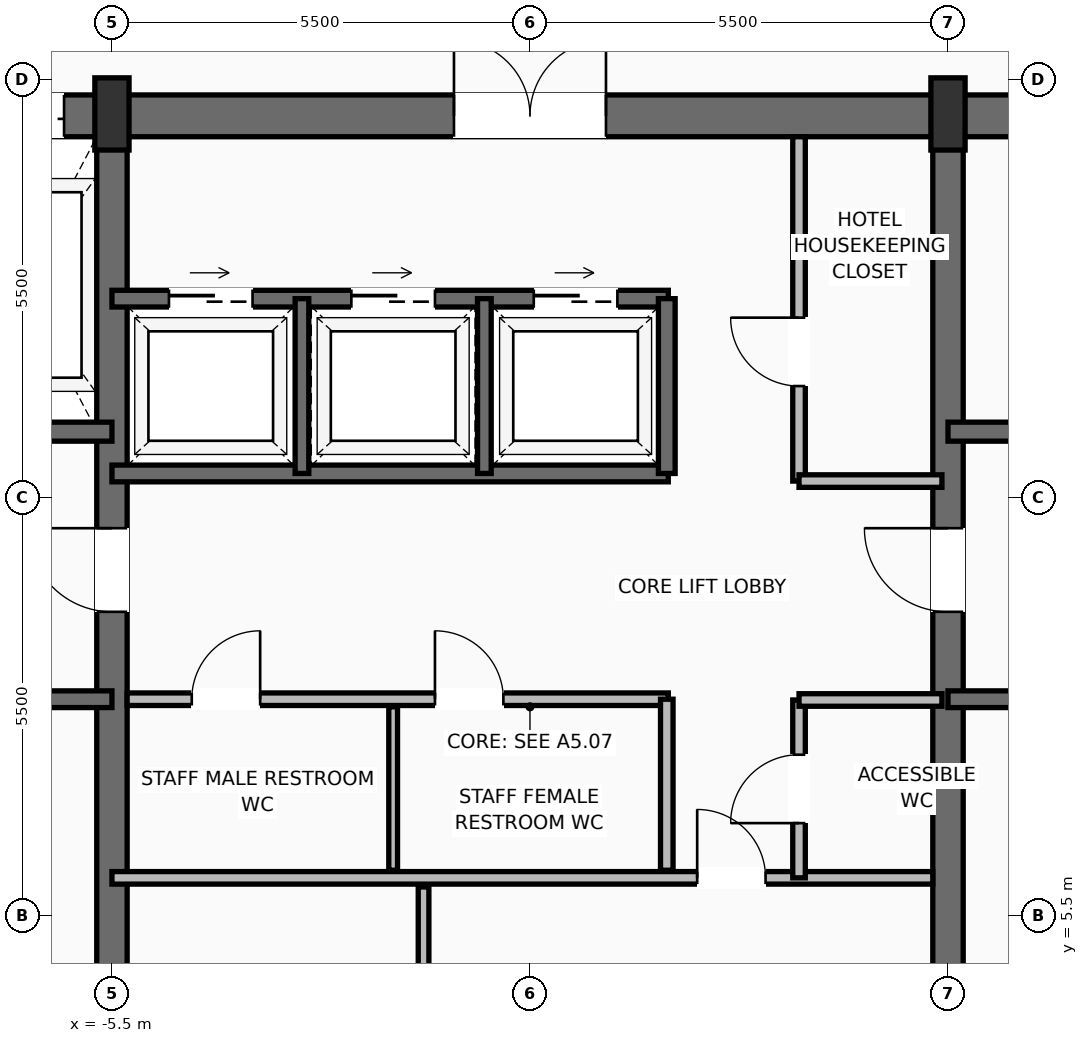
"""IFC4 building model, lengths in metres.
Left out: names, types, materials, properties, quantities, classifications, styles, units other than length and angle.
Written with IfcOpenShell. Run it as: python <this file> out.ifc"""

import sys

from ifc_helpers import new_model, si_unit, direction, frame, frame_2d, origin, origin_2d, place, context, subcontext, project, spatial, rectangle, extrude, source, transform, mapped, element, fill, save


model = new_model("IFC4")
c1 = context("Model", 3, precision=1e-05, world=origin(), true_north=direction((0.0, 1.0)))
c2 = subcontext(c1, "Body", "Model", "MODEL_VIEW")
j1 = project(units=[si_unit("LENGTHUNIT", "METRE"), si_unit("PLANEANGLEUNIT", "RADIAN")], contexts=[c1])
p1 = place(None, origin())
s1 = spatial("IfcSite", under=j1, at=p1, CompositionType="ELEMENT")
p2 = place(p1, origin())
s2 = spatial("IfcBuilding", under=s1, at=p2, CompositionType="ELEMENT")
p3 = place(p2, frame((0.0, 0.0, 240.7)))
s3 = spatial("IfcBuildingStorey", under=s2, at=p3, CompositionType="ELEMENT", Elevation=240.7)
p4 = place(p3, frame((-10.7, 16.025, 0.0), z_axis=(0.0, 0.0, 1.0), x_axis=(1.0, 0.0, 0.0)))
e1 = element("IfcWall", 1, at=p4, inside=s3, PredefinedType="SHEAR", context=c2, shape_type="SweptSolid", body=[
    extrude(rectangle(XDim=21.4, YDim=0.55, at=frame_2d((10.7, 0.0))), origin(), (0.0, 0.0, 1.0), 3.24),
])
p5 = place(p4, frame((3.27, 0.0, 0.0)))
e2 = element("IfcOpeningElement", 2, at=p5, cuts=e1, PredefinedType="OPENING", context=c2, shape_type="SweptSolid", body=[
    extrude(rectangle(XDim=1.3, YDim=2.3, at=frame_2d((0.65, 1.15))), frame((0.0, 0.285, 0.0), z_axis=(0.0, -1.0, 0.0), x_axis=(1.0, 0.0, 0.0)), (0.0, 0.0, 1.0), 0.57),
])
p6 = place(p4, frame((9.7, 0.0, 0.0)))
e3 = element("IfcOpeningElement", 3, at=p6, cuts=e1, PredefinedType="OPENING", context=c2, shape_type="SweptSolid", body=[
    extrude(rectangle(XDim=2.0, YDim=2.4, at=frame_2d((1.0, 1.2))), frame((0.0, 0.285, 0.0), z_axis=(0.0, -1.0, 0.0), x_axis=(1.0, 0.0, 0.0)), (0.0, 0.0, 1.0), 0.57),
])
p7 = place(p3, frame((-5.5, 0.575, 0.0), z_axis=(0.0, 0.0, 1.0), x_axis=(0.0, 1.0, 0.0)))
e4 = element("IfcWall", 4, at=p7, inside=s3, PredefinedType="SHEAR", context=c2, shape_type="SweptSolid", body=[
    extrude(rectangle(XDim=15.45, YDim=0.4, at=frame_2d((7.725, 0.0))), origin(), (0.0, 0.0, 1.0), 3.24),
])
p8 = place(p7, frame((8.925, 0.0, 0.0)))
e5 = element("IfcOpeningElement", 5, at=p8, cuts=e4, PredefinedType="OPENING", context=c2, shape_type="SweptSolid", body=[
    extrude(rectangle(XDim=1.1, YDim=2.2, at=frame_2d((0.55, 1.1))), frame((0.0, 0.21, 0.0), z_axis=(0.0, -1.0, 0.0), x_axis=(1.0, 0.0, 0.0)), (0.0, 0.0, 1.0), 0.42),
])
p9 = place(p3, frame((5.5, 0.575, 0.0), z_axis=(0.0, 0.0, 1.0), x_axis=(0.0, 1.0, 0.0)))
e6 = element("IfcWall", 6, at=p9, inside=s3, PredefinedType="SHEAR", context=c2, shape_type="SweptSolid", body=[
    extrude(rectangle(XDim=15.45, YDim=0.4, at=frame_2d((7.725, 0.0))), origin(), (0.0, 0.0, 1.0), 3.24),
])
p10 = place(p9, frame((8.925, 0.0, 0.0)))
e7 = element("IfcOpeningElement", 7, at=p10, cuts=e6, PredefinedType="OPENING", context=c2, shape_type="SweptSolid", body=[
    extrude(rectangle(XDim=1.1, YDim=2.2, at=frame_2d((0.55, 1.1))), frame((0.0, 0.21, 0.0), z_axis=(0.0, -1.0, 0.0), x_axis=(1.0, 0.0, 0.0)), (0.0, 0.0, 1.0), 0.42),
])
m1 = source(origin(), c2, "Body", "SweptSolid", [
    extrude(rectangle(XDim=0.45, YDim=0.95, at=origin_2d()), origin(), (0.0, 0.0, 1.0), 3.45),
])
for number, where, z_axis, x_axis in (
    (8, (-5.5, 16.05, 0.0), (0.0, 0.0, 1.0), (1.0, 0.0, 0.0)),
    (9, (5.5, 16.05, 0.0), (0.0, 0.0, 1.0), (1.0, 0.0, 0.0)),
):
    element("IfcColumn", number, at=place(p3, frame(where, z_axis=z_axis, x_axis=x_axis)), inside=s3, PredefinedType="PILASTER", context=c2, shape_type="MappedRepresentation", body=[
        mapped(m1, transform((0.0, 0.0, 0.0), scale=1.0)),
    ])
p11 = place(p3, frame((-5.5, 8.35, 0.0), z_axis=(0.0, 0.0, 1.0), x_axis=(-1.0, 0.0, 0.0)))
e10 = element("IfcWall", 10, at=p11, inside=s3, PredefinedType="SOLIDWALL", context=c2, shape_type="SweptSolid", body=[
    extrude(rectangle(XDim=4.65, YDim=0.22, at=frame_2d((2.325, 0.0))), origin(), (0.0, 0.0, 1.0), 3.24),
])
p12 = place(p11, frame((2.5, 0.0, 0.0)))
e11 = element("IfcOpeningElement", 11, at=p12, cuts=e10, PredefinedType="OPENING", context=c2, shape_type="SweptSolid", body=[
    extrude(rectangle(XDim=1.15, YDim=2.2, at=frame_2d((0.575, 1.1))), frame((0.0, 0.12, 0.0), z_axis=(0.0, -1.0, 0.0), x_axis=(1.0, 0.0, 0.0)), (0.0, 0.0, 1.0), 0.24),
])
p13 = place(p3, frame((-5.5, 11.87, 0.0), z_axis=(0.0, 0.0, 1.0), x_axis=(-1.0, 0.0, 0.0)))
e12 = element("IfcWall", 12, at=p13, inside=s3, PredefinedType="SOLIDWALL", context=c2, shape_type="SweptSolid", body=[
    extrude(rectangle(XDim=4.65, YDim=0.25, at=frame_2d((2.325, 0.0))), origin(), (0.0, 0.0, 1.0), 3.24),
])
p14 = place(p13, frame((2.95, 0.0, 0.0)))
e13 = element("IfcOpeningElement", 13, at=p14, cuts=e12, PredefinedType="OPENING", context=c2, shape_type="SweptSolid", body=[
    extrude(rectangle(XDim=1.2, YDim=2.25, at=frame_2d((0.6, 1.125))), frame((0.0, 0.135, 0.0), z_axis=(0.0, -1.0, 0.0), x_axis=(1.0, 0.0, 0.0)), (0.0, 0.0, 1.0), 0.27),
])
p15 = place(p3, frame((10.15, 8.35, 0.0), z_axis=(0.0, 0.0, 1.0), x_axis=(-1.0, 0.0, 0.0)))
e14 = element("IfcWall", 14, at=p15, inside=s3, PredefinedType="SOLIDWALL", context=c2, shape_type="SweptSolid", body=[
    extrude(rectangle(XDim=4.65, YDim=0.22, at=frame_2d((2.325, 0.0))), origin(), (0.0, 0.0, 1.0), 3.24),
])
p16 = place(p15, frame((1.0, 0.0, 0.0)))
e15 = element("IfcOpeningElement", 15, at=p16, cuts=e14, PredefinedType="OPENING", context=c2, shape_type="SweptSolid", body=[
    extrude(rectangle(XDim=1.15, YDim=2.2, at=frame_2d((0.575, 1.1))), frame((0.0, 0.12, 0.0), z_axis=(0.0, -1.0, 0.0), x_axis=(1.0, 0.0, 0.0)), (0.0, 0.0, 1.0), 0.24),
])
p17 = place(p3, frame((10.15, 11.87, 0.0), z_axis=(0.0, 0.0, 1.0), x_axis=(-1.0, 0.0, 0.0)))
e16 = element("IfcWall", 16, at=p17, inside=s3, PredefinedType="SOLIDWALL", context=c2, shape_type="SweptSolid", body=[
    extrude(rectangle(XDim=4.65, YDim=0.25, at=frame_2d((2.325, 0.0))), origin(), (0.0, 0.0, 1.0), 3.24),
])
p18 = place(p17, frame((0.5, 0.0, 0.0)))
e17 = element("IfcOpeningElement", 17, at=p18, cuts=e16, PredefinedType="OPENING", context=c2, shape_type="SweptSolid", body=[
    extrude(rectangle(XDim=1.2, YDim=2.25, at=frame_2d((0.6, 1.125))), frame((0.0, 0.135, 0.0), z_axis=(0.0, -1.0, 0.0), x_axis=(1.0, 0.0, 0.0)), (0.0, 0.0, 1.0), 0.27),
])
p19 = place(p3, frame((-5.5, 6.0, 0.0), z_axis=(0.0, 0.0, 1.0), x_axis=(1.0, 0.0, 0.0)))
e18 = element("IfcWall", 18, at=p19, inside=s3, PredefinedType="PARTITIONING", context=c2, shape_type="SweptSolid", body=[
    extrude(rectangle(XDim=10.8, YDim=0.165, at=frame_2d((5.4, 0.0))), origin(), (0.0, 0.0, 1.0), 3.232),
])
p20 = place(p19, frame((7.7, 0.0, 0.0)))
e19 = element("IfcOpeningElement", 19, at=p20, cuts=e18, PredefinedType="OPENING", context=c2, shape_type="SweptSolid", body=[
    extrude(rectangle(XDim=0.9, YDim=2.1, at=frame_2d((0.45, 1.05))), frame((0.0, 0.093, 0.0), z_axis=(0.0, -1.0, 0.0), x_axis=(1.0, 0.0, 0.0)), (0.0, 0.0, 1.0), 0.185),
])
p21 = place(p3, frame((-1.4, 0.85, 0.0), z_axis=(0.0, 0.0, 1.0), x_axis=(0.0, 1.0, 0.0)))
e20 = element("IfcWall", 20, at=p21, inside=s3, PredefinedType="PARTITIONING", context=c2, shape_type="SweptSolid", body=[
    extrude(rectangle(XDim=5.03, YDim=0.14, at=frame_2d((2.515, 0.0))), origin(), (0.0, 0.0, 1.0), 3.232),
])
p22 = place(p21, frame((2.1, 0.0, 0.0)))
e21 = element("IfcOpeningElement", 21, at=p22, cuts=e20, PredefinedType="OPENING", context=c2, shape_type="SweptSolid", body=[
    extrude(rectangle(XDim=0.9, YDim=2.1, at=frame_2d((0.45, 1.05))), frame((0.0, 0.08, 0.0), z_axis=(0.0, -1.0, 0.0), x_axis=(1.0, 0.0, 0.0)), (0.0, 0.0, 1.0), 0.16),
])
p23 = place(p3, frame((3.54, 6.0, 0.0), z_axis=(0.0, 0.0, 1.0), x_axis=(0.0, 1.0, 0.0)))
e22 = element("IfcWall", 22, at=p23, inside=s3, PredefinedType="PARTITIONING", context=c2, shape_type="SweptSolid", body=[
    extrude(rectangle(XDim=2.34, YDim=0.165, at=frame_2d((1.17, 0.0))), origin(), (0.0, 0.0, 1.0), 3.232),
])
p24 = place(p23, frame((0.72, 0.0, 0.0)))
e23 = element("IfcOpeningElement", 23, at=p24, cuts=e22, PredefinedType="OPENING", context=c2, shape_type="SweptSolid", body=[
    extrude(rectangle(XDim=0.9, YDim=2.1, at=frame_2d((0.45, 1.05))), frame((0.0, 0.093, 0.0), z_axis=(0.0, -1.0, 0.0), x_axis=(1.0, 0.0, 0.0)), (0.0, 0.0, 1.0), 0.185),
])
p25 = place(p3, frame((3.54, 8.34, 0.0), z_axis=(0.0, 0.0, 1.0), x_axis=(1.0, 0.0, 0.0)))
e24 = element("IfcWall", 24, at=p25, inside=s3, PredefinedType="PARTITIONING", context=c2, shape_type="SweptSolid", body=[
    extrude(rectangle(XDim=1.88, YDim=0.165, at=frame_2d((0.94, 0.0))), origin(), (0.0, 0.0, 1.0), 3.232),
])
p26 = place(p3, frame((-5.3, 8.35, 0.0), z_axis=(0.0, 0.0, 1.0), x_axis=(1.0, 0.0, 0.0)))
e25 = element("IfcWall", 25, at=p26, inside=s3, PredefinedType="PARTITIONING", context=c2, shape_type="SweptSolid", body=[
    extrude(rectangle(XDim=7.12, YDim=0.165, at=frame_2d((3.56, 0.0))), origin(), (0.0, 0.0, 1.0), 3.232),
])
p27 = place(p26, frame((0.85, 0.0, 0.0)))
e26 = element("IfcOpeningElement", 26, at=p27, cuts=e25, PredefinedType="OPENING", context=c2, shape_type="SweptSolid", body=[
    extrude(rectangle(XDim=0.9, YDim=2.1, at=frame_2d((0.45, 1.05))), frame((0.0, 0.093, 0.0), z_axis=(0.0, -1.0, 0.0), x_axis=(1.0, 0.0, 0.0)), (0.0, 0.0, 1.0), 0.185),
])
p28 = place(p26, frame((4.05, 0.0, 0.0)))
e27 = element("IfcOpeningElement", 27, at=p28, cuts=e25, PredefinedType="OPENING", context=c2, shape_type="SweptSolid", body=[
    extrude(rectangle(XDim=0.9, YDim=2.1, at=frame_2d((0.45, 1.05))), frame((0.0, 0.093, 0.0), z_axis=(0.0, -1.0, 0.0), x_axis=(1.0, 0.0, 0.0)), (0.0, 0.0, 1.0), 0.185),
])
p29 = place(p3, frame((1.8, 6.1, 0.0), z_axis=(0.0, 0.0, 1.0), x_axis=(0.0, 1.0, 0.0)))
e28 = element("IfcWall", 28, at=p29, inside=s3, PredefinedType="PARTITIONING", context=c2, shape_type="SweptSolid", body=[
    extrude(rectangle(XDim=2.25, YDim=0.165, at=frame_2d((1.125, 0.0))), origin(), (0.0, 0.0, 1.0), 3.232),
])
p30 = place(p3, frame((-1.8, 6.1, 0.0), z_axis=(0.0, 0.0, 1.0), x_axis=(0.0, 1.0, 0.0)))
e29 = element("IfcWall", 29, at=p30, inside=s3, PredefinedType="PARTITIONING", context=c2, shape_type="SweptSolid", body=[
    extrude(rectangle(XDim=2.15, YDim=0.115, at=frame_2d((1.075, 0.0))), origin(), (0.0, 0.0, 1.0), 3.232),
])
p31 = place(p3, frame((-5.5, 11.32, 0.0), z_axis=(0.0, 0.0, 1.0), x_axis=(1.0, 0.0, 0.0)))
e30 = element("IfcWall", 30, at=p31, inside=s3, PredefinedType="SOLIDWALL", context=c2, shape_type="SweptSolid", body=[
    extrude(rectangle(XDim=7.32, YDim=0.22, at=frame_2d((3.66, 0.0))), origin(), (0.0, 0.0, 1.0), 3.24),
])
p32 = place(p3, frame((-5.5, 13.62, 0.0), z_axis=(0.0, 0.0, 1.0), x_axis=(1.0, 0.0, 0.0)))
e31 = element("IfcWall", 31, at=p32, inside=s3, PredefinedType="SOLIDWALL", context=c2, shape_type="SweptSolid", body=[
    extrude(rectangle(XDim=7.32, YDim=0.22, at=frame_2d((3.66, 0.0))), origin(), (0.0, 0.0, 1.0), 3.24),
])
p33 = place(p32, frame((0.75, 0.0, 0.0)))
e32 = element("IfcOpeningElement", 32, at=p33, cuts=e31, PredefinedType="OPENING", context=c2, shape_type="SweptSolid", body=[
    extrude(rectangle(XDim=1.1, YDim=2.2, at=frame_2d((0.55, 1.1))), frame((0.0, 0.12, 0.0), z_axis=(0.0, -1.0, 0.0), x_axis=(1.0, 0.0, 0.0)), (0.0, 0.0, 1.0), 0.24),
])
p34 = place(p32, frame((3.15, 0.0, 0.0)))
e33 = element("IfcOpeningElement", 33, at=p34, cuts=e31, PredefinedType="OPENING", context=c2, shape_type="SweptSolid", body=[
    extrude(rectangle(XDim=1.1, YDim=2.2, at=frame_2d((0.55, 1.1))), frame((0.0, 0.12, 0.0), z_axis=(0.0, -1.0, 0.0), x_axis=(1.0, 0.0, 0.0)), (0.0, 0.0, 1.0), 0.24),
])
p35 = place(p32, frame((5.55, 0.0, 0.0)))
e34 = element("IfcOpeningElement", 34, at=p35, cuts=e31, PredefinedType="OPENING", context=c2, shape_type="SweptSolid", body=[
    extrude(rectangle(XDim=1.1, YDim=2.2, at=frame_2d((0.55, 1.1))), frame((0.0, 0.12, 0.0), z_axis=(0.0, -1.0, 0.0), x_axis=(1.0, 0.0, 0.0)), (0.0, 0.0, 1.0), 0.24),
])
p36 = place(p3, frame((1.8, 11.32, 0.0), z_axis=(0.0, 0.0, 1.0), x_axis=(0.0, 1.0, 0.0)))
e35 = element("IfcWall", 35, at=p36, inside=s3, PredefinedType="SOLIDWALL", context=c2, shape_type="SweptSolid", body=[
    extrude(rectangle(XDim=2.3, YDim=0.22, at=frame_2d((1.15, 0.0))), origin(), (0.0, 0.0, 1.0), 3.24),
])
for number, where, z_axis, x_axis in (
    (36, (-3.0, 11.32, 0.0), (0.0, 0.0, 1.0), (0.0, 1.0, 0.0)),
    (37, (-0.6, 11.32, 0.0), (0.0, 0.0, 1.0), (0.0, 1.0, 0.0)),
):
    element("IfcWall", number, at=place(p3, frame(where, z_axis=z_axis, x_axis=x_axis)), inside=s3, PredefinedType="SOLIDWALL", context=c2, shape_type="SweptSolid", body=[
        extrude(rectangle(XDim=2.3, YDim=0.18, at=frame_2d((1.15, 0.0))), origin(), (0.0, 0.0, 1.0), 3.24),
    ])
p37 = place(p3, frame((3.54, 11.22, 0.0), z_axis=(0.0, 0.0, 1.0), x_axis=(0.0, 1.0, 0.0)))
e38 = element("IfcWall", 38, at=p37, inside=s3, PredefinedType="PARTITIONING", context=c2, shape_type="SweptSolid", body=[
    extrude(rectangle(XDim=4.53, YDim=0.165, at=frame_2d((2.265, 0.0))), origin(), (0.0, 0.0, 1.0), 3.232),
])
p38 = place(p37, frame((1.25, 0.0, 0.0)))
e39 = element("IfcOpeningElement", 39, at=p38, cuts=e38, PredefinedType="OPENING", context=c2, shape_type="SweptSolid", body=[
    extrude(rectangle(XDim=0.9, YDim=2.1, at=frame_2d((0.45, 1.05))), frame((0.0, 0.093, 0.0), z_axis=(0.0, -1.0, 0.0), x_axis=(1.0, 0.0, 0.0)), (0.0, 0.0, 1.0), 0.185),
])
p39 = place(p3, frame((3.54, 11.22, 0.0), z_axis=(0.0, 0.0, 1.0), x_axis=(1.0, 0.0, 0.0)))
e40 = element("IfcWall", 40, at=p39, inside=s3, PredefinedType="PARTITIONING", context=c2, shape_type="SweptSolid", body=[
    extrude(rectangle(XDim=1.88, YDim=0.165, at=frame_2d((0.94, 0.0))), origin(), (0.0, 0.0, 1.0), 3.232),
])
m2 = source(origin(), c2, "Body", "SweptSolid", [
    extrude(rectangle(XDim=1.1, YDim=2.2, at=frame_2d((0.55, 1.1))), frame((0.0, 0.025, 0.0), z_axis=(0.0, -1.0, 0.0), x_axis=(1.0, 0.0, 0.0)), (0.0, 0.0, 1.0), 0.05),
])
p40 = place(p8, origin())
e41 = element("IfcDoor", 41, at=p40, inside=s3, OperationType="SINGLE_SWING_RIGHT", PredefinedType="DOOR", context=c2, shape_type="MappedRepresentation", body=[
    mapped(m2, transform((0.0, 0.0, 0.0), scale=1.0)),
])
fill(e5, e41)
m3 = source(origin(), c2, "Body", "SweptSolid", [
    extrude(rectangle(XDim=1.3, YDim=2.3, at=frame_2d((0.65, 1.15))), frame((0.0, 0.025, 0.0), z_axis=(0.0, -1.0, 0.0), x_axis=(1.0, 0.0, 0.0)), (0.0, 0.0, 1.0), 0.05),
])
p41 = place(p5, origin())
e42 = element("IfcDoor", 42, at=p41, inside=s3, OperationType="SLIDING_TO_RIGHT", PredefinedType="DOOR", context=c2, shape_type="MappedRepresentation", body=[
    mapped(m3, transform((0.0, 0.0, 0.0), scale=1.0)),
])
fill(e2, e42)
p42 = place(p10, origin())
e43 = element("IfcDoor", 43, at=p42, inside=s3, OperationType="SINGLE_SWING_RIGHT", PredefinedType="DOOR", context=c2, shape_type="MappedRepresentation", body=[
    mapped(m2, transform((0.0, 0.0, 0.0), scale=1.0)),
])
fill(e7, e43)
m4 = source(origin(), c2, "Body", "SweptSolid", [
    extrude(rectangle(XDim=2.0, YDim=2.4, at=frame_2d((1.0, 1.2))), frame((0.0, 0.025, 0.0), z_axis=(0.0, -1.0, 0.0), x_axis=(1.0, 0.0, 0.0)), (0.0, 0.0, 1.0), 0.05),
])
p43 = place(p6, origin())
e44 = element("IfcDoor", 44, at=p43, inside=s3, OperationType="DOUBLE_DOOR_SINGLE_SWING", PredefinedType="DOOR", context=c2, shape_type="MappedRepresentation", body=[
    mapped(m4, transform((0.0, 0.0, 0.0), scale=1.0)),
])
fill(e3, e44)
m5 = source(origin(), c2, "Body", "SweptSolid", [
    extrude(rectangle(XDim=0.9, YDim=2.1, at=frame_2d((0.45, 1.05))), frame((0.0, 0.025, 0.0), z_axis=(0.0, -1.0, 0.0), x_axis=(1.0, 0.0, 0.0)), (0.0, 0.0, 1.0), 0.05),
])
p44 = place(p20, origin())
e45 = element("IfcDoor", 45, at=p44, inside=s3, OperationType="SINGLE_SWING_LEFT", PredefinedType="DOOR", context=c2, shape_type="MappedRepresentation", body=[
    mapped(m5, transform((0.0, 0.0, 0.0), scale=1.0)),
])
fill(e19, e45)
p45 = place(p24, origin())
e46 = element("IfcDoor", 46, at=p45, inside=s3, OperationType="SINGLE_SWING_LEFT", PredefinedType="DOOR", context=c2, shape_type="MappedRepresentation", body=[
    mapped(m5, transform((0.0, 0.0, 0.0), scale=1.0)),
])
fill(e23, e46)
p46 = place(p27, origin())
e47 = element("IfcDoor", 47, at=p46, inside=s3, OperationType="SINGLE_SWING_RIGHT", PredefinedType="DOOR", context=c2, shape_type="MappedRepresentation", body=[
    mapped(m5, transform((0.0, 0.0, 0.0), scale=1.0)),
])
fill(e26, e47)
p47 = place(p28, origin())
e48 = element("IfcDoor", 48, at=p47, inside=s3, OperationType="SINGLE_SWING_LEFT", PredefinedType="DOOR", context=c2, shape_type="MappedRepresentation", body=[
    mapped(m5, transform((0.0, 0.0, 0.0), scale=1.0)),
])
fill(e27, e48)
m6 = source(origin(), c2, "Body", "SweptSolid", [
    extrude(rectangle(XDim=1.1, YDim=2.2, at=frame_2d((0.55, 1.1))), frame((0.0, 0.025, 0.0), z_axis=(0.0, -1.0, 0.0), x_axis=(1.0, 0.0, 0.0)), (0.0, 0.0, 1.0), 0.05),
])
p48 = place(p33, origin())
e49 = element("IfcDoor", 49, at=p48, inside=s3, OperationType="SLIDING_TO_RIGHT", PredefinedType="DOOR", context=c2, shape_type="MappedRepresentation", body=[
    mapped(m6, transform((0.0, 0.0, 0.0), scale=1.0)),
])
fill(e32, e49)
p49 = place(p34, origin())
e50 = element("IfcDoor", 50, at=p49, inside=s3, OperationType="SLIDING_TO_RIGHT", PredefinedType="DOOR", context=c2, shape_type="MappedRepresentation", body=[
    mapped(m6, transform((0.0, 0.0, 0.0), scale=1.0)),
])
fill(e33, e50)
p50 = place(p35, origin())
e51 = element("IfcDoor", 51, at=p50, inside=s3, OperationType="SLIDING_TO_RIGHT", PredefinedType="DOOR", context=c2, shape_type="MappedRepresentation", body=[
    mapped(m6, transform((0.0, 0.0, 0.0), scale=1.0)),
])
fill(e34, e51)
p51 = place(p38, origin())
e52 = element("IfcDoor", 52, at=p51, inside=s3, OperationType="SINGLE_SWING_RIGHT", PredefinedType="DOOR", context=c2, shape_type="MappedRepresentation", body=[
    mapped(m5, transform((0.0, 0.0, 0.0), scale=1.0)),
])
fill(e39, e52)
save(model, sys.argv[1])
